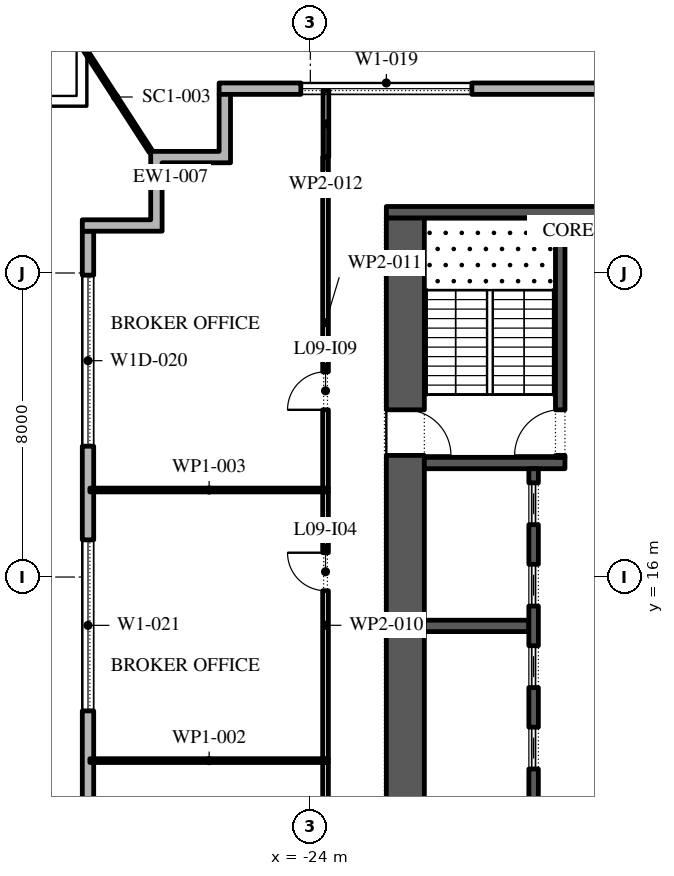
"""IFC4 building model, lengths in metres.
Left out: names, types, materials, properties, quantities, classifications, styles, units other than length and angle.
Written with IfcOpenShell. Run it as: python <this file> out.ifc"""

import sys

from ifc_helpers import new_model, si_unit, direction, frame, frame_2d, origin, place, context, subcontext, project, spatial, polyline, rectangle, outline, extrude, element, fill, save


model = new_model("IFC4")
c1 = context("Model", 3, precision=1e-05, world=origin(), true_north=direction((0.0, 1.0)))
c2 = subcontext(c1, "Body", "Model", "MODEL_VIEW")
j1 = project(units=[si_unit("LENGTHUNIT", "METRE"), si_unit("PLANEANGLEUNIT", "RADIAN")], contexts=[c1])
p1 = place(None, origin())
s1 = spatial("IfcSite", under=j1, at=p1, CompositionType="ELEMENT")
p2 = place(p1, origin())
s2 = spatial("IfcBuilding", under=s1, at=p2, CompositionType="ELEMENT")
p3 = place(p2, frame((0.0, 0.0, 48.0)))
s3 = spatial("IfcBuildingStorey", under=s2, at=p3, CompositionType="ELEMENT", Elevation=48.0)
p4 = place(p3, frame((26.1, 28.85, 0.0), z_axis=(0.0, 0.0, 1.0), x_axis=(-1.0, 0.0, 0.0)))
e1 = element("IfcWall", 1, at=p4, inside=s3, PredefinedType="STANDARD", context=c2, shape_type="SweptSolid", body=[
    extrude(rectangle(XDim=52.5, YDim=0.3, at=frame_2d((26.25, 0.0))), origin(), (0.0, 0.0, 1.0), 4.0),
])
p5 = place(p4, frame((2.0, 0.0, 0.45)))
e2 = element("IfcOpeningElement", 2, at=p5, cuts=e1, PredefinedType="OPENING", context=c2, shape_type="SweptSolid", body=[
    extrude(rectangle(XDim=4.5, YDim=3.05, at=frame_2d((2.25, 1.525))), frame((0.0, 0.16, 0.0), z_axis=(0.0, -1.0, 0.0), x_axis=(1.0, 0.0, 0.0)), (0.0, 0.0, 1.0), 0.32),
])
p6 = place(p4, frame((10.65, 0.0, 0.45)))
e3 = element("IfcOpeningElement", 3, at=p6, cuts=e1, PredefinedType="OPENING", context=c2, shape_type="SweptSolid", body=[
    extrude(rectangle(XDim=4.5, YDim=3.05, at=frame_2d((2.25, 1.525))), frame((0.0, 0.16, 0.0), z_axis=(0.0, -1.0, 0.0), x_axis=(1.0, 0.0, 0.0)), (0.0, 0.0, 1.0), 0.32),
])
p7 = place(p4, frame((20.5, 0.0, 0.0)))
e4 = element("IfcOpeningElement", 4, at=p7, cuts=e1, PredefinedType="OPENING", context=c2, shape_type="SweptSolid", body=[
    extrude(rectangle(XDim=2.4, YDim=3.5, at=frame_2d((1.2, 1.75))), frame((0.0, 0.16, 0.0), z_axis=(0.0, -1.0, 0.0), x_axis=(1.0, 0.0, 0.0)), (0.0, 0.0, 1.0), 0.32),
])
p8 = place(p4, frame((28.25, 0.0, 0.45)))
e5 = element("IfcOpeningElement", 5, at=p8, cuts=e1, PredefinedType="OPENING", context=c2, shape_type="SweptSolid", body=[
    extrude(rectangle(XDim=4.5, YDim=3.05, at=frame_2d((2.25, 1.525))), frame((0.0, 0.16, 0.0), z_axis=(0.0, -1.0, 0.0), x_axis=(1.0, 0.0, 0.0)), (0.0, 0.0, 1.0), 0.32),
])
p9 = place(p4, frame((37.05, 0.0, 0.45)))
e6 = element("IfcOpeningElement", 6, at=p9, cuts=e1, PredefinedType="OPENING", context=c2, shape_type="SweptSolid", body=[
    extrude(rectangle(XDim=4.5, YDim=3.05, at=frame_2d((2.25, 1.525))), frame((0.0, 0.16, 0.0), z_axis=(0.0, -1.0, 0.0), x_axis=(1.0, 0.0, 0.0)), (0.0, 0.0, 1.0), 0.32),
])
p10 = place(p4, frame((45.85, 0.0, 0.45)))
e7 = element("IfcOpeningElement", 7, at=p10, cuts=e1, PredefinedType="OPENING", context=c2, shape_type="SweptSolid", body=[
    extrude(rectangle(XDim=4.5, YDim=3.05, at=frame_2d((2.25, 1.525))), frame((0.0, 0.16, 0.0), z_axis=(0.0, -1.0, 0.0), x_axis=(1.0, 0.0, 0.0)), (0.0, 0.0, 1.0), 0.32),
])
p11 = place(p3, frame((-29.85, 25.1, 0.0), z_axis=(0.0, 0.0, 1.0), x_axis=(0.0, -1.0, 0.0)))
e8 = element("IfcWall", 8, at=p11, inside=s3, PredefinedType="STANDARD", context=c2, shape_type="SweptSolid", body=[
    extrude(rectangle(XDim=49.5, YDim=0.3, at=frame_2d((24.75, 0.0))), origin(), (0.0, 0.0, 1.0), 4.0),
])
p12 = place(p11, frame((1.157, 0.0, 0.45)))
e9 = element("IfcOpeningElement", 9, at=p12, cuts=e8, PredefinedType="OPENING", context=c2, shape_type="SweptSolid", body=[
    extrude(rectangle(XDim=4.5, YDim=2.875, at=frame_2d((2.25, 1.438))), frame((0.0, 0.16, 0.0), z_axis=(0.0, -1.0, 0.0), x_axis=(1.0, 0.0, 0.0)), (0.0, 0.0, 1.0), 0.32),
])
p13 = place(p11, frame((8.121, 0.0, 0.45)))
e10 = element("IfcOpeningElement", 10, at=p13, cuts=e8, PredefinedType="OPENING", context=c2, shape_type="SweptSolid", body=[
    extrude(rectangle(XDim=4.5, YDim=3.05, at=frame_2d((2.25, 1.525))), frame((0.0, 0.16, 0.0), z_axis=(0.0, -1.0, 0.0), x_axis=(1.0, 0.0, 0.0)), (0.0, 0.0, 1.0), 0.32),
])
p14 = place(p11, frame((16.286, 0.0, 0.0)))
e11 = element("IfcOpeningElement", 11, at=p14, cuts=e8, PredefinedType="OPENING", context=c2, shape_type="SweptSolid", body=[
    extrude(rectangle(XDim=2.4, YDim=3.325, at=frame_2d((1.2, 1.663))), frame((0.0, 0.16, 0.0), z_axis=(0.0, -1.0, 0.0), x_axis=(1.0, 0.0, 0.0)), (0.0, 0.0, 1.0), 0.32),
])
p15 = place(p11, frame((22.35, 0.0, 0.45)))
e12 = element("IfcOpeningElement", 12, at=p15, cuts=e8, PredefinedType="OPENING", context=c2, shape_type="SweptSolid", body=[
    extrude(rectangle(XDim=4.5, YDim=2.875, at=frame_2d((2.25, 1.438))), frame((0.0, 0.16, 0.0), z_axis=(0.0, -1.0, 0.0), x_axis=(1.0, 0.0, 0.0)), (0.0, 0.0, 1.0), 0.32),
])
p16 = place(p11, frame((29.464, 0.0, 0.45)))
e13 = element("IfcOpeningElement", 13, at=p16, cuts=e8, PredefinedType="OPENING", context=c2, shape_type="SweptSolid", body=[
    extrude(rectangle(XDim=4.5, YDim=2.875, at=frame_2d((2.25, 1.438))), frame((0.0, 0.16, 0.0), z_axis=(0.0, -1.0, 0.0), x_axis=(1.0, 0.0, 0.0)), (0.0, 0.0, 1.0), 0.32),
])
p17 = place(p11, frame((36.579, 0.0, 0.45)))
e14 = element("IfcOpeningElement", 14, at=p17, cuts=e8, PredefinedType="OPENING", context=c2, shape_type="SweptSolid", body=[
    extrude(rectangle(XDim=4.5, YDim=2.825, at=frame_2d((2.25, 1.413))), frame((0.0, 0.16, 0.0), z_axis=(0.0, -1.0, 0.0), x_axis=(1.0, 0.0, 0.0)), (0.0, 0.0, 1.0), 0.32),
])
p18 = place(p11, frame((44.743, 0.0, 0.0)))
e15 = element("IfcOpeningElement", 15, at=p18, cuts=e8, PredefinedType="OPENING", context=c2, shape_type="SweptSolid", body=[
    extrude(rectangle(XDim=2.4, YDim=3.5, at=frame_2d((1.2, 1.75))), frame((0.0, 0.16, 0.0), z_axis=(0.0, -1.0, 0.0), x_axis=(1.0, 0.0, 0.0)), (0.0, 0.0, 1.0), 0.32),
])
p19 = place(p3, origin())
e16 = element("IfcWall", 16, at=p19, inside=s3, PredefinedType="STANDARD", context=c2, shape_type="SweptSolid", body=[
    extrude(outline(polyline([(-28.2, 25.4), (-28.2, 27.2), (-26.4, 27.2), (-26.4, 28.7), (-26.1, 28.7), (-26.1, 26.9), (-27.9, 26.9), (-27.9, 25.1), (-30.0, 25.1), (-30.0, 25.4), (-28.2, 25.4)])), origin(), (0.0, 0.0, 1.0), 4.0),
])
p20 = place(p3, frame((-28.2, 27.2, -0.05), z_axis=(0.0, 0.0, 1.0), x_axis=(-0.543224544992, 0.839587454479, 0.0)))
e17 = element("IfcWall", 17, at=p20, inside=s3, PredefinedType="STANDARD", context=c2, shape_type="SweptSolid", body=[
    extrude(rectangle(XDim=3.408, YDim=0.1, at=frame_2d((1.704, 0.0))), origin(), (0.0, 0.0, 1.0), 4.05),
])
p21 = place(p3, frame((-21.5, -2.45, 0.0), z_axis=(0.0, 0.0, 1.0), x_axis=(0.0, 1.0, 0.0)))
e18 = element("IfcWall", 18, at=p21, inside=s3, PredefinedType="SHEAR", context=c2, shape_type="SweptSolid", body=[
    extrude(rectangle(XDim=27.9, YDim=1.0, at=frame_2d((13.95, 0.0))), origin(), (0.0, 0.0, 1.0), 4.0),
])
p22 = place(p21, frame((5.05, 0.0, 0.0)))
e19 = element("IfcOpeningElement", 19, at=p22, cuts=e18, PredefinedType="OPENING", context=c2, shape_type="SweptSolid", body=[
    extrude(rectangle(XDim=1.2, YDim=2.1, at=frame_2d((0.6, 1.05))), frame((0.0, 0.51, 0.0), z_axis=(0.0, -1.0, 0.0), x_axis=(1.0, 0.0, 0.0)), (0.0, 0.0, 1.0), 1.02),
])
p23 = place(p21, frame((21.65, 0.0, 0.0)))
e20 = element("IfcOpeningElement", 20, at=p23, cuts=e18, PredefinedType="OPENING", context=c2, shape_type="SweptSolid", body=[
    extrude(rectangle(XDim=1.2, YDim=2.1, at=frame_2d((0.6, 1.05))), frame((0.0, 0.51, 0.0), z_axis=(0.0, -1.0, 0.0), x_axis=(1.0, 0.0, 0.0)), (0.0, 0.0, 1.0), 1.02),
])
p24 = place(p3, frame((-22.0, 25.6, 0.0), z_axis=(0.0, 0.0, 1.0), x_axis=(1.0, 0.0, 0.0)))
e21 = element("IfcWall", 21, at=p24, inside=s3, PredefinedType="SHEAR", context=c2, shape_type="SweptSolid", body=[
    extrude(rectangle(XDim=12.0, YDim=0.3, at=frame_2d((6.0, 0.0))), origin(), (0.0, 0.0, 1.0), 4.0),
])
p25 = place(p3, frame((-21.0, 19.0, 0.0), z_axis=(0.0, 0.0, 1.0), x_axis=(1.0, 0.0, 0.0)))
e22 = element("IfcWall", 22, at=p25, inside=s3, PredefinedType="SHEAR", context=c2, shape_type="SweptSolid", body=[
    extrude(rectangle(XDim=3.7, YDim=0.3, at=frame_2d((1.85, 0.0))), origin(), (0.0, 0.0, 1.0), 4.0),
])
p26 = place(p3, frame((-17.425, 19.15, 0.0), z_axis=(0.0, 0.0, 1.0), x_axis=(0.0, 1.0, 0.0)))
e23 = element("IfcWall", 23, at=p26, inside=s3, PredefinedType="SHEAR", context=c2, shape_type="SweptSolid", body=[
    extrude(rectangle(XDim=6.3, YDim=0.25, at=frame_2d((3.15, 0.0))), origin(), (0.0, 0.0, 1.0), 4.0),
])
p27 = place(p26, frame((0.05, 0.0, 0.0)))
e24 = element("IfcOpeningElement", 24, at=p27, cuts=e23, PredefinedType="OPENING", context=c2, shape_type="SweptSolid", body=[
    extrude(rectangle(XDim=1.2, YDim=2.1, at=frame_2d((0.6, 1.05))), frame((0.0, 0.135, 0.0), z_axis=(0.0, -1.0, 0.0), x_axis=(1.0, 0.0, 0.0)), (0.0, 0.0, 1.0), 0.27),
])
p28 = place(p3, frame((-21.0, 14.714, 0.0), z_axis=(0.0, 0.0, 1.0), x_axis=(1.0, 0.0, 0.0)))
e25 = element("IfcWall", 25, at=p28, inside=s3, PredefinedType="SHEAR", context=c2, shape_type="SweptSolid", body=[
    extrude(rectangle(XDim=2.75, YDim=0.3, at=frame_2d((1.375, 0.0))), origin(), (0.0, 0.0, 1.0), 4.0),
])
p29 = place(p3, frame((-18.125, 4.15, 0.0), z_axis=(0.0, 0.0, 1.0), x_axis=(0.0, 1.0, 0.0)))
e26 = element("IfcWall", 26, at=p29, inside=s3, PredefinedType="SHEAR", context=c2, shape_type="SweptSolid", body=[
    extrude(rectangle(XDim=14.7, YDim=0.25, at=frame_2d((7.35, 0.0))), origin(), (0.0, 0.0, 1.0), 4.0),
])
p30 = place(p29, frame((0.371, 0.0, 0.0)))
e27 = element("IfcOpeningElement", 27, at=p30, cuts=e26, PredefinedType="OPENING", context=c2, shape_type="SweptSolid", body=[
    extrude(rectangle(XDim=1.1, YDim=2.1, at=frame_2d((0.55, 1.05))), frame((0.0, 0.135, 0.0), z_axis=(0.0, -1.0, 0.0), x_axis=(1.0, 0.0, 0.0)), (0.0, 0.0, 1.0), 0.27),
])
p31 = place(p29, frame((2.514, 0.0, 0.0)))
e28 = element("IfcOpeningElement", 28, at=p31, cuts=e26, PredefinedType="OPENING", context=c2, shape_type="SweptSolid", body=[
    extrude(rectangle(XDim=1.1, YDim=2.1, at=frame_2d((0.55, 1.05))), frame((0.0, 0.135, 0.0), z_axis=(0.0, -1.0, 0.0), x_axis=(1.0, 0.0, 0.0)), (0.0, 0.0, 1.0), 0.27),
])
p32 = place(p29, frame((4.657, 0.0, 0.0)))
e29 = element("IfcOpeningElement", 29, at=p32, cuts=e26, PredefinedType="OPENING", context=c2, shape_type="SweptSolid", body=[
    extrude(rectangle(XDim=1.1, YDim=2.1, at=frame_2d((0.55, 1.05))), frame((0.0, 0.135, 0.0), z_axis=(0.0, -1.0, 0.0), x_axis=(1.0, 0.0, 0.0)), (0.0, 0.0, 1.0), 0.27),
])
p33 = place(p29, frame((6.8, 0.0, 0.0)))
e30 = element("IfcOpeningElement", 30, at=p33, cuts=e26, PredefinedType="OPENING", context=c2, shape_type="SweptSolid", body=[
    extrude(rectangle(XDim=1.1, YDim=2.1, at=frame_2d((0.55, 1.05))), frame((0.0, 0.135, 0.0), z_axis=(0.0, -1.0, 0.0), x_axis=(1.0, 0.0, 0.0)), (0.0, 0.0, 1.0), 0.27),
])
p34 = place(p29, frame((8.943, 0.0, 0.0)))
e31 = element("IfcOpeningElement", 31, at=p34, cuts=e26, PredefinedType="OPENING", context=c2, shape_type="SweptSolid", body=[
    extrude(rectangle(XDim=1.1, YDim=2.1, at=frame_2d((0.55, 1.05))), frame((0.0, 0.135, 0.0), z_axis=(0.0, -1.0, 0.0), x_axis=(1.0, 0.0, 0.0)), (0.0, 0.0, 1.0), 0.27),
])
p35 = place(p29, frame((11.086, 0.0, 0.0)))
e32 = element("IfcOpeningElement", 32, at=p35, cuts=e26, PredefinedType="OPENING", context=c2, shape_type="SweptSolid", body=[
    extrude(rectangle(XDim=1.1, YDim=2.1, at=frame_2d((0.55, 1.05))), frame((0.0, 0.135, 0.0), z_axis=(0.0, -1.0, 0.0), x_axis=(1.0, 0.0, 0.0)), (0.0, 0.0, 1.0), 0.27),
])
p36 = place(p29, frame((13.229, 0.0, 0.0)))
e33 = element("IfcOpeningElement", 33, at=p36, cuts=e26, PredefinedType="OPENING", context=c2, shape_type="SweptSolid", body=[
    extrude(rectangle(XDim=1.1, YDim=2.1, at=frame_2d((0.55, 1.05))), frame((0.0, 0.135, 0.0), z_axis=(0.0, -1.0, 0.0), x_axis=(1.0, 0.0, 0.0)), (0.0, 0.0, 1.0), 0.27),
])
for number, where, z_axis, x_axis in (
    (34, (-29.8, 11.17, 0.0), (0.0, 0.0, 1.0), (1.0, 0.0, 0.0)),
    (35, (-29.8, 18.29, 0.0), (0.0, 0.0, 1.0), (1.0, 0.0, 0.0)),
):
    element("IfcWall", number, at=place(p3, frame(where, z_axis=z_axis, x_axis=x_axis)), inside=s3, PredefinedType="PARTITIONING", context=c2, shape_type="SweptSolid", body=[
        extrude(rectangle(XDim=6.275, YDim=0.1, at=frame_2d((3.138, 0.0))), origin(), (0.0, 0.0, 1.0), 4.0),
    ])
p37 = place(p3, frame((-23.6, -3.01, 0.0), z_axis=(0.0, 0.0, 1.0), x_axis=(0.0, 1.0, 0.0)))
e36 = element("IfcWall", 36, at=p37, inside=s3, PredefinedType="PARTITIONING", context=c2, shape_type="SweptSolid", body=[
    extrude(rectangle(XDim=14.13, YDim=0.15, at=frame_2d((7.065, 0.0))), origin(), (0.0, 0.0, 1.0), 4.0),
])
p38 = place(p37, frame((6.53, 0.0, 0.0)))
e37 = element("IfcOpeningElement", 37, at=p38, cuts=e36, PredefinedType="OPENING", context=c2, shape_type="SweptSolid", body=[
    extrude(rectangle(XDim=1.0, YDim=2.1, at=frame_2d((0.5, 1.05))), frame((0.0, 0.085, 0.0), z_axis=(0.0, -1.0, 0.0), x_axis=(1.0, 0.0, 0.0)), (0.0, 0.0, 1.0), 0.17),
])
p39 = place(p3, frame((-23.6, 11.22, 0.0), z_axis=(0.0, 0.0, 1.0), x_axis=(0.0, 1.0, 0.0)))
e38 = element("IfcWall", 38, at=p39, inside=s3, PredefinedType="PARTITIONING", context=c2, shape_type="SweptSolid", body=[
    extrude(rectangle(XDim=7.02, YDim=0.15, at=frame_2d((3.51, 0.0))), origin(), (0.0, 0.0, 1.0), 4.0),
])
p40 = place(p39, frame((4.42, 0.0, 0.0)))
e39 = element("IfcOpeningElement", 39, at=p40, cuts=e38, PredefinedType="OPENING", context=c2, shape_type="SweptSolid", body=[
    extrude(rectangle(XDim=1.0, YDim=2.1, at=frame_2d((0.5, 1.05))), frame((0.0, 0.085, 0.0), z_axis=(0.0, -1.0, 0.0), x_axis=(1.0, 0.0, 0.0)), (0.0, 0.0, 1.0), 0.17),
])
p41 = place(p3, frame((-23.6, 18.34, 0.0), z_axis=(0.0, 0.0, 1.0), x_axis=(0.0, 1.0, 0.0)))
e40 = element("IfcWall", 40, at=p41, inside=s3, PredefinedType="PARTITIONING", context=c2, shape_type="SweptSolid", body=[
    extrude(rectangle(XDim=8.71, YDim=0.15, at=frame_2d((4.355, 0.0))), origin(), (0.0, 0.0, 1.0), 4.0),
])
p42 = place(p41, frame((2.06, 0.0, 0.0)))
e41 = element("IfcOpeningElement", 41, at=p42, cuts=e40, PredefinedType="OPENING", context=c2, shape_type="SweptSolid", body=[
    extrude(rectangle(XDim=1.0, YDim=2.1, at=frame_2d((0.5, 1.05))), frame((0.0, 0.085, 0.0), z_axis=(0.0, -1.0, 0.0), x_axis=(1.0, 0.0, 0.0)), (0.0, 0.0, 1.0), 0.17),
])
p43 = place(p3, frame((-23.59, 27.05, 0.0), z_axis=(0.0, 0.0, 1.0), x_axis=(0.0, 1.0, 0.0)))
e42 = element("IfcWall", 42, at=p43, inside=s3, PredefinedType="PARTITIONING", context=c2, shape_type="SweptSolid", body=[
    extrude(rectangle(XDim=1.75, YDim=0.15, at=frame_2d((0.875, 0.0))), origin(), (0.0, 0.0, 1.0), 4.0),
])
p44 = place(p10, origin())
e43 = element("IfcWindow", 43, at=p44, inside=s3, PartitioningType="DOUBLE_PANEL_VERTICAL", PredefinedType="WINDOW", context=c2, shape_type="SweptSolid", body=[
    extrude(rectangle(XDim=4.5, YDim=3.05, at=frame_2d((2.25, 1.525))), frame((0.0, 0.03, 0.0), z_axis=(0.0, -1.0, 0.0), x_axis=(1.0, 0.0, 0.0)), (0.0, 0.0, 1.0), 0.06),
])
fill(e7, e43)
p45 = place(p12, origin())
e44 = element("IfcWindow", 44, at=p45, inside=s3, PartitioningType="DOUBLE_PANEL_VERTICAL", PredefinedType="WINDOW", context=c2, shape_type="SweptSolid", body=[
    extrude(rectangle(XDim=4.5, YDim=2.875, at=frame_2d((2.25, 1.438))), frame((0.0, 0.03, 0.0), z_axis=(0.0, -1.0, 0.0), x_axis=(1.0, 0.0, 0.0)), (0.0, 0.0, 1.0), 0.06),
])
fill(e9, e44)
p46 = place(p13, origin())
e45 = element("IfcWindow", 45, at=p46, inside=s3, PartitioningType="DOUBLE_PANEL_VERTICAL", PredefinedType="WINDOW", context=c2, shape_type="SweptSolid", body=[
    extrude(rectangle(XDim=4.5, YDim=3.05, at=frame_2d((2.25, 1.525))), frame((0.0, 0.03, 0.0), z_axis=(0.0, -1.0, 0.0), x_axis=(1.0, 0.0, 0.0)), (0.0, 0.0, 1.0), 0.06),
])
fill(e10, e45)
p47 = place(p33, origin())
e46 = element("IfcDoor", 46, at=p47, inside=s3, OperationType="SLIDING_TO_LEFT", PredefinedType="DOOR", context=c2, shape_type="SweptSolid", body=[
    extrude(rectangle(XDim=1.1, YDim=2.1, at=frame_2d((0.55, 1.05))), frame((0.0, 0.025, 0.0), z_axis=(0.0, -1.0, 0.0), x_axis=(1.0, 0.0, 0.0)), (0.0, 0.0, 1.0), 0.05),
])
fill(e30, e46)
p48 = place(p34, origin())
e47 = element("IfcDoor", 47, at=p48, inside=s3, OperationType="SLIDING_TO_LEFT", PredefinedType="DOOR", context=c2, shape_type="SweptSolid", body=[
    extrude(rectangle(XDim=1.1, YDim=2.1, at=frame_2d((0.55, 1.05))), frame((0.0, 0.025, 0.0), z_axis=(0.0, -1.0, 0.0), x_axis=(1.0, 0.0, 0.0)), (0.0, 0.0, 1.0), 0.05),
])
fill(e31, e47)
p49 = place(p35, origin())
e48 = element("IfcDoor", 48, at=p49, inside=s3, OperationType="SLIDING_TO_LEFT", PredefinedType="DOOR", context=c2, shape_type="SweptSolid", body=[
    extrude(rectangle(XDim=1.1, YDim=2.1, at=frame_2d((0.55, 1.05))), frame((0.0, 0.025, 0.0), z_axis=(0.0, -1.0, 0.0), x_axis=(1.0, 0.0, 0.0)), (0.0, 0.0, 1.0), 0.05),
])
fill(e32, e48)
p50 = place(p36, origin())
e49 = element("IfcDoor", 49, at=p50, inside=s3, OperationType="SLIDING_TO_LEFT", PredefinedType="DOOR", context=c2, shape_type="SweptSolid", body=[
    extrude(rectangle(XDim=1.1, YDim=2.1, at=frame_2d((0.55, 1.05))), frame((0.0, 0.025, 0.0), z_axis=(0.0, -1.0, 0.0), x_axis=(1.0, 0.0, 0.0)), (0.0, 0.0, 1.0), 0.05),
])
fill(e33, e49)
p51 = place(p27, origin())
e50 = element("IfcDoor", 50, at=p51, inside=s3, OperationType="SINGLE_SWING_RIGHT", PredefinedType="DOOR", context=c2, shape_type="SweptSolid", body=[
    extrude(rectangle(XDim=1.2, YDim=2.1, at=frame_2d((0.6, 1.05))), frame((0.0, 0.025, 0.0), z_axis=(0.0, -1.0, 0.0), x_axis=(1.0, 0.0, 0.0)), (0.0, 0.0, 1.0), 0.05),
])
fill(e24, e50)
p52 = place(p23, frame((1.2, 0.0, 0.0), z_axis=(0.0, 0.0, 1.0), x_axis=(-1.0, 0.0, 0.0)))
e51 = element("IfcDoor", 51, at=p52, inside=s3, OperationType="SINGLE_SWING_LEFT", PredefinedType="DOOR", context=c2, shape_type="SweptSolid", body=[
    extrude(rectangle(XDim=1.2, YDim=2.1, at=frame_2d((0.6, 1.05))), frame((0.0, 0.025, 0.0), z_axis=(0.0, -1.0, 0.0), x_axis=(1.0, 0.0, 0.0)), (0.0, 0.0, 1.0), 0.05),
])
fill(e20, e51)
p53 = place(p40, origin())
e52 = element("IfcDoor", 52, at=p53, inside=s3, OperationType="SINGLE_SWING_LEFT", PredefinedType="DOOR", context=c2, shape_type="SweptSolid", body=[
    extrude(rectangle(XDim=1.0, YDim=2.1, at=frame_2d((0.5, 1.05))), frame((0.0, 0.025, 0.0), z_axis=(0.0, -1.0, 0.0), x_axis=(1.0, 0.0, 0.0)), (0.0, 0.0, 1.0), 0.05),
])
fill(e39, e52)
p54 = place(p42, origin())
e53 = element("IfcDoor", 53, at=p54, inside=s3, OperationType="SINGLE_SWING_RIGHT", PredefinedType="DOOR", context=c2, shape_type="SweptSolid", body=[
    extrude(rectangle(XDim=1.0, YDim=2.1, at=frame_2d((0.5, 1.05))), frame((0.0, 0.025, 0.0), z_axis=(0.0, -1.0, 0.0), x_axis=(1.0, 0.0, 0.0)), (0.0, 0.0, 1.0), 0.05),
])
fill(e41, e53)
save(model, sys.argv[1])
